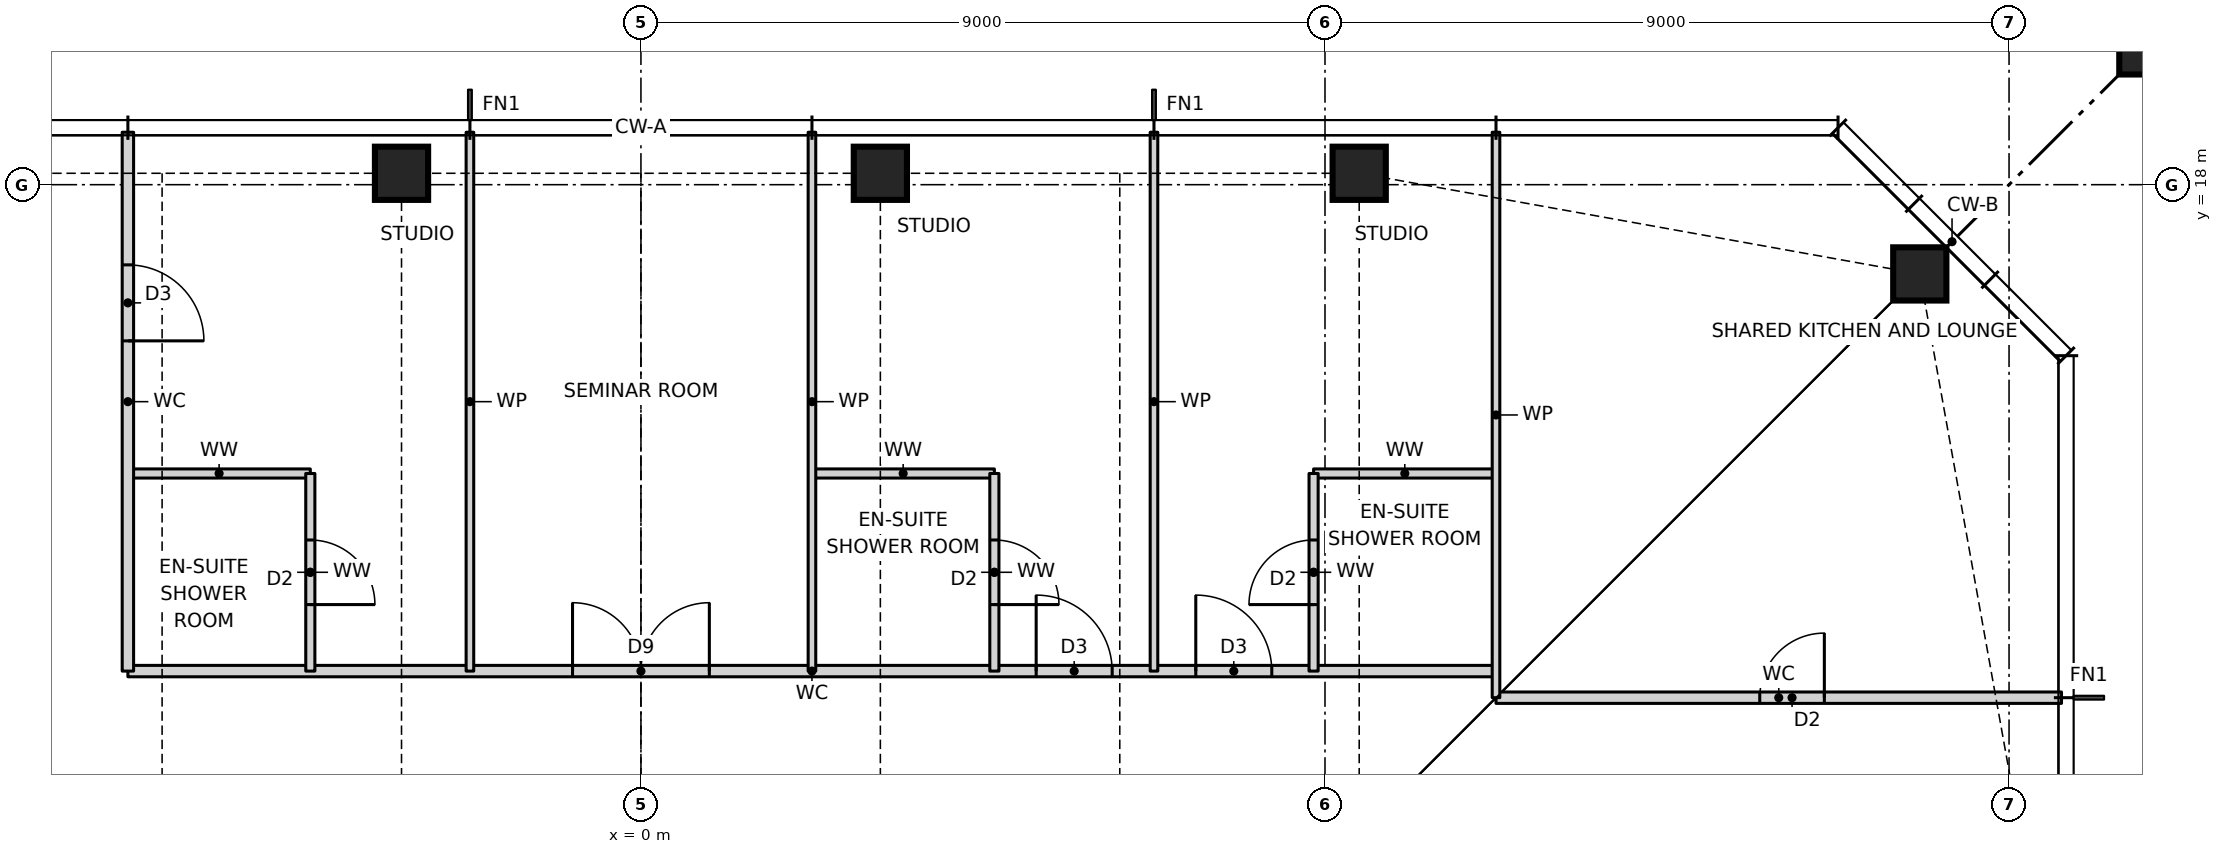
"""IFC4 building model, lengths in metres.
Left out: names, types, materials, properties, quantities, classifications, styles, units other than length and angle.
Written with IfcOpenShell. Run it as: python <this file> out.ifc"""

import sys

from ifc_helpers import new_model, si_unit, direction, frame, frame_2d, origin, origin_2d, place, context, subcontext, project, spatial, rectangle, hollow_rectangle, i_section, extrude, element, fill, save


model = new_model("IFC4")
c1 = context("Model", 3, precision=1e-05, world=origin(), true_north=direction((0.0, 1.0)))
c2 = subcontext(c1, "Body", "Model", "MODEL_VIEW")
j1 = project(units=[si_unit("LENGTHUNIT", "METRE"), si_unit("PLANEANGLEUNIT", "RADIAN")], contexts=[c1])
p1 = place(None, origin())
s1 = spatial("IfcSite", under=j1, at=p1, CompositionType="ELEMENT")
p2 = place(p1, origin())
s2 = spatial("IfcBuilding", under=s1, at=p2, CompositionType="ELEMENT")
p3 = place(p2, frame((0.0, 0.0, 156.5)))
s3 = spatial("IfcBuildingStorey", under=s2, at=p3, CompositionType="ELEMENT", Elevation=156.5)
for number, where, z_axis, x_axis in (
    (1, (16.826, 16.826, 0.0), (0.0, 0.0, 1.0), (1.0, 0.0, 0.0)),
    (2, (9.45, 18.15, 0.0), (0.0, 0.0, 1.0), (1.0, 0.0, 0.0)),
    (3, (3.15, 18.15, 0.0), (0.0, 0.0, 1.0), (1.0, 0.0, 0.0)),
    (4, (-3.15, 18.15, 0.0), (0.0, 0.0, 1.0), (1.0, 0.0, 0.0)),
):
    element("IfcColumn", number, at=place(p3, frame(where, z_axis=z_axis, x_axis=x_axis)), inside=s3, PredefinedType="COLUMN", context=c2, shape_type="SweptSolid", body=[
        extrude(hollow_rectangle(XDim=0.7, YDim=0.7, WallThickness=0.06, at=origin_2d()), origin(), (0.0, 0.0, 1.0), 3.5),
    ])
p4 = place(p3, frame((21.65, 21.65, 0.0), z_axis=(0.0, 0.0, 1.0), x_axis=(1.0, 0.0, 0.0)))
e5 = element("IfcColumn", 5, at=p4, inside=s3, PredefinedType="COLUMN", context=c2, shape_type="SweptSolid", body=[
    extrude(rectangle(XDim=4.4, YDim=4.4, at=origin_2d()), origin(), (0.0, 0.0, 1.0), 3.5),
    extrude(i_section(OverallWidth=0.478, OverallDepth=0.599, WebThickness=0.1, FlangeThickness=0.14, at=origin_2d()), origin(), (0.0, 0.0, 1.0), 3.5),
])
p5 = place(p3, frame((11.25, 11.25, 0.0), z_axis=(0.0, 0.0, 1.0), x_axis=(1.0, 0.0, 0.0)))
e6 = element("IfcWall", 6, at=p5, inside=s3, PredefinedType="PARTITIONING", context=c2, shape_type="SweptSolid", body=[
    extrude(rectangle(XDim=7.44, YDim=0.15, at=frame_2d((3.72, 0.0))), origin(), (0.0, 0.0, 1.0), 3.27),
])
p6 = place(p5, frame((3.47, 0.0, 0.0)))
e7 = element("IfcOpeningElement", 7, at=p6, cuts=e6, PredefinedType="OPENING", context=c2, shape_type="SweptSolid", body=[
    extrude(rectangle(XDim=0.85, YDim=2.1, at=frame_2d((0.425, 1.05))), frame((0.0, 0.085, 0.0), z_axis=(0.0, -1.0, 0.0), x_axis=(1.0, 0.0, 0.0)), (0.0, 0.0, 1.0), 0.17),
])
p7 = place(p3, frame((-6.75, 11.6, 0.0), z_axis=(0.0, 0.0, 1.0), x_axis=(1.0, 0.0, 0.0)))
e8 = element("IfcWall", 8, at=p7, inside=s3, PredefinedType="PARTITIONING", context=c2, shape_type="SweptSolid", body=[
    extrude(rectangle(XDim=18.0, YDim=0.15, at=frame_2d((9.0, 0.0))), origin(), (0.0, 0.0, 1.0), 3.27),
])
p8 = place(p7, frame((14.05, 0.0, 0.0)))
e9 = element("IfcOpeningElement", 9, at=p8, cuts=e8, PredefinedType="OPENING", context=c2, shape_type="SweptSolid", body=[
    extrude(rectangle(XDim=1.0, YDim=2.1, at=frame_2d((0.5, 1.05))), frame((0.0, 0.085, 0.0), z_axis=(0.0, -1.0, 0.0), x_axis=(1.0, 0.0, 0.0)), (0.0, 0.0, 1.0), 0.17),
])
p9 = place(p7, frame((11.95, 0.0, 0.0)))
e10 = element("IfcOpeningElement", 10, at=p9, cuts=e8, PredefinedType="OPENING", context=c2, shape_type="SweptSolid", body=[
    extrude(rectangle(XDim=1.0, YDim=2.1, at=frame_2d((0.5, 1.05))), frame((0.0, 0.085, 0.0), z_axis=(0.0, -1.0, 0.0), x_axis=(1.0, 0.0, 0.0)), (0.0, 0.0, 1.0), 0.17),
])
p10 = place(p7, frame((5.85, 0.0, 0.0)))
e11 = element("IfcOpeningElement", 11, at=p10, cuts=e8, PredefinedType="OPENING", context=c2, shape_type="SweptSolid", body=[
    extrude(rectangle(XDim=1.8, YDim=2.1, at=frame_2d((0.9, 1.05))), frame((0.0, 0.085, 0.0), z_axis=(0.0, -1.0, 0.0), x_axis=(1.0, 0.0, 0.0)), (0.0, 0.0, 1.0), 0.17),
])
for number, where, z_axis, x_axis in (
    (12, (-6.75, 14.2, 0.0), (0.0, 0.0, 1.0), (1.0, 0.0, 0.0)),
    (13, (2.25, 14.2, 0.0), (0.0, 0.0, 1.0), (1.0, 0.0, 0.0)),
    (14, (8.85, 14.2, 0.0), (0.0, 0.0, 1.0), (1.0, 0.0, 0.0)),
):
    element("IfcWall", number, at=place(p3, frame(where, z_axis=z_axis, x_axis=x_axis)), inside=s3, PredefinedType="PARTITIONING", context=c2, shape_type="SweptSolid", body=[
        extrude(rectangle(XDim=2.4, YDim=0.12, at=frame_2d((1.2, 0.0))), origin(), (0.0, 0.0, 1.0), 3.27),
    ])
p11 = place(p3, frame((11.25, 11.25, 0.0), z_axis=(0.0, 0.0, 1.0), x_axis=(0.0, 1.0, 0.0)))
e15 = element("IfcWall", 15, at=p11, inside=s3, PredefinedType="PARTITIONING", context=c2, shape_type="SweptSolid", body=[
    extrude(rectangle(XDim=7.44, YDim=0.1, at=frame_2d((3.72, 0.0))), origin(), (0.0, 0.0, 1.0), 3.27),
])
p12 = place(p3, frame((8.85, 11.6, 0.0), z_axis=(0.0, 0.0, 1.0), x_axis=(0.0, 1.0, 0.0)))
e16 = element("IfcWall", 16, at=p12, inside=s3, PredefinedType="PARTITIONING", context=c2, shape_type="SweptSolid", body=[
    extrude(rectangle(XDim=2.6, YDim=0.12, at=frame_2d((1.3, 0.0))), origin(), (0.0, 0.0, 1.0), 3.27),
])
p13 = place(p12, frame((0.875, 0.0, 0.0)))
e17 = element("IfcOpeningElement", 17, at=p13, cuts=e16, PredefinedType="OPENING", context=c2, shape_type="SweptSolid", body=[
    extrude(rectangle(XDim=0.85, YDim=2.1, at=frame_2d((0.425, 1.05))), frame((0.0, 0.07, 0.0), z_axis=(0.0, -1.0, 0.0), x_axis=(1.0, 0.0, 0.0)), (0.0, 0.0, 1.0), 0.14),
])
p14 = place(p3, frame((6.75, 11.6, 0.0), z_axis=(0.0, 0.0, 1.0), x_axis=(0.0, 1.0, 0.0)))
e18 = element("IfcWall", 18, at=p14, inside=s3, PredefinedType="PARTITIONING", context=c2, shape_type="SweptSolid", body=[
    extrude(rectangle(XDim=7.09, YDim=0.1, at=frame_2d((3.545, 0.0))), origin(), (0.0, 0.0, 1.0), 3.27),
])
p15 = place(p3, frame((4.65, 11.6, 0.0), z_axis=(0.0, 0.0, 1.0), x_axis=(0.0, 1.0, 0.0)))
e19 = element("IfcWall", 19, at=p15, inside=s3, PredefinedType="PARTITIONING", context=c2, shape_type="SweptSolid", body=[
    extrude(rectangle(XDim=2.6, YDim=0.12, at=frame_2d((1.3, 0.0))), origin(), (0.0, 0.0, 1.0), 3.27),
])
p16 = place(p15, frame((0.875, 0.0, 0.0)))
e20 = element("IfcOpeningElement", 20, at=p16, cuts=e19, PredefinedType="OPENING", context=c2, shape_type="SweptSolid", body=[
    extrude(rectangle(XDim=0.85, YDim=2.1, at=frame_2d((0.425, 1.05))), frame((0.0, 0.07, 0.0), z_axis=(0.0, -1.0, 0.0), x_axis=(1.0, 0.0, 0.0)), (0.0, 0.0, 1.0), 0.14),
])
for number, where, z_axis, x_axis in (
    (21, (2.25, 11.6, 0.0), (0.0, 0.0, 1.0), (0.0, 1.0, 0.0)),
    (22, (-2.25, 11.6, 0.0), (0.0, 0.0, 1.0), (0.0, 1.0, 0.0)),
):
    element("IfcWall", number, at=place(p3, frame(where, z_axis=z_axis, x_axis=x_axis)), inside=s3, PredefinedType="PARTITIONING", context=c2, shape_type="SweptSolid", body=[
        extrude(rectangle(XDim=7.09, YDim=0.1, at=frame_2d((3.545, 0.0))), origin(), (0.0, 0.0, 1.0), 3.27),
    ])
p17 = place(p3, frame((-4.35, 11.6, 0.0), z_axis=(0.0, 0.0, 1.0), x_axis=(0.0, 1.0, 0.0)))
e23 = element("IfcWall", 23, at=p17, inside=s3, PredefinedType="PARTITIONING", context=c2, shape_type="SweptSolid", body=[
    extrude(rectangle(XDim=2.6, YDim=0.12, at=frame_2d((1.3, 0.0))), origin(), (0.0, 0.0, 1.0), 3.27),
])
p18 = place(p17, frame((0.875, 0.0, 0.0)))
e24 = element("IfcOpeningElement", 24, at=p18, cuts=e23, PredefinedType="OPENING", context=c2, shape_type="SweptSolid", body=[
    extrude(rectangle(XDim=0.85, YDim=2.1, at=frame_2d((0.425, 1.05))), frame((0.0, 0.07, 0.0), z_axis=(0.0, -1.0, 0.0), x_axis=(1.0, 0.0, 0.0)), (0.0, 0.0, 1.0), 0.14),
])
p19 = place(p3, frame((-6.75, 11.6, 0.0), z_axis=(0.0, 0.0, 1.0), x_axis=(0.0, 1.0, 0.0)))
e25 = element("IfcWall", 25, at=p19, inside=s3, PredefinedType="PARTITIONING", context=c2, shape_type="SweptSolid", body=[
    extrude(rectangle(XDim=7.09, YDim=0.15, at=frame_2d((3.545, 0.0))), origin(), (0.0, 0.0, 1.0), 3.27),
])
p20 = place(p19, frame((4.345, 0.0, 0.0)))
e26 = element("IfcOpeningElement", 26, at=p20, cuts=e25, PredefinedType="OPENING", context=c2, shape_type="SweptSolid", body=[
    extrude(rectangle(XDim=1.0, YDim=2.1, at=frame_2d((0.5, 1.05))), frame((0.0, 0.085, 0.0), z_axis=(0.0, -1.0, 0.0), x_axis=(1.0, 0.0, 0.0)), (0.0, 0.0, 1.0), 0.17),
])
p21 = place(p8, origin())
e27 = element("IfcDoor", 27, at=p21, inside=s3, OperationType="SINGLE_SWING_LEFT", PredefinedType="DOOR", context=c2, shape_type="SweptSolid", body=[
    extrude(rectangle(XDim=1.0, YDim=2.1, at=frame_2d((0.5, 1.05))), frame((0.0, 0.025, 0.0), z_axis=(0.0, -1.0, 0.0), x_axis=(1.0, 0.0, 0.0)), (0.0, 0.0, 1.0), 0.05),
])
fill(e9, e27)
p22 = place(p13, origin())
e28 = element("IfcDoor", 28, at=p22, inside=s3, OperationType="SINGLE_SWING_LEFT", PredefinedType="DOOR", context=c2, shape_type="SweptSolid", body=[
    extrude(rectangle(XDim=0.85, YDim=2.1, at=frame_2d((0.425, 1.05))), frame((0.0, 0.025, 0.0), z_axis=(0.0, -1.0, 0.0), x_axis=(1.0, 0.0, 0.0)), (0.0, 0.0, 1.0), 0.05),
])
fill(e17, e28)
p23 = place(p9, origin())
e29 = element("IfcDoor", 29, at=p23, inside=s3, OperationType="SINGLE_SWING_LEFT", PredefinedType="DOOR", context=c2, shape_type="SweptSolid", body=[
    extrude(rectangle(XDim=1.0, YDim=2.1, at=frame_2d((0.5, 1.05))), frame((0.0, 0.025, 0.0), z_axis=(0.0, -1.0, 0.0), x_axis=(1.0, 0.0, 0.0)), (0.0, 0.0, 1.0), 0.05),
])
fill(e10, e29)
p24 = place(p16, frame((0.85, 0.0, 0.0), z_axis=(0.0, 0.0, 1.0), x_axis=(-1.0, 0.0, 0.0)))
e30 = element("IfcDoor", 30, at=p24, inside=s3, OperationType="SINGLE_SWING_RIGHT", PredefinedType="DOOR", context=c2, shape_type="SweptSolid", body=[
    extrude(rectangle(XDim=0.85, YDim=2.1, at=frame_2d((0.425, 1.05))), frame((0.0, 0.025, 0.0), z_axis=(0.0, -1.0, 0.0), x_axis=(1.0, 0.0, 0.0)), (0.0, 0.0, 1.0), 0.05),
])
fill(e20, e30)
p25 = place(p10, origin())
e31 = element("IfcDoor", 31, at=p25, inside=s3, OperationType="DOUBLE_DOOR_SINGLE_SWING", PredefinedType="DOOR", context=c2, shape_type="SweptSolid", body=[
    extrude(rectangle(XDim=1.8, YDim=2.1, at=frame_2d((0.9, 1.05))), frame((0.0, 0.025, 0.0), z_axis=(0.0, -1.0, 0.0), x_axis=(1.0, 0.0, 0.0)), (0.0, 0.0, 1.0), 0.05),
])
fill(e11, e31)
p26 = place(p20, frame((1.0, 0.0, 0.0), z_axis=(0.0, 0.0, 1.0), x_axis=(-1.0, 0.0, 0.0)))
e32 = element("IfcDoor", 32, at=p26, inside=s3, OperationType="SINGLE_SWING_RIGHT", PredefinedType="DOOR", context=c2, shape_type="SweptSolid", body=[
    extrude(rectangle(XDim=1.0, YDim=2.1, at=frame_2d((0.5, 1.05))), frame((0.0, 0.025, 0.0), z_axis=(0.0, -1.0, 0.0), x_axis=(1.0, 0.0, 0.0)), (0.0, 0.0, 1.0), 0.05),
])
fill(e26, e32)
p27 = place(p18, frame((0.85, 0.0, 0.0), z_axis=(0.0, 0.0, 1.0), x_axis=(-1.0, 0.0, 0.0)))
e33 = element("IfcDoor", 33, at=p27, inside=s3, OperationType="SINGLE_SWING_RIGHT", PredefinedType="DOOR", context=c2, shape_type="SweptSolid", body=[
    extrude(rectangle(XDim=0.85, YDim=2.1, at=frame_2d((0.425, 1.05))), frame((0.0, 0.025, 0.0), z_axis=(0.0, -1.0, 0.0), x_axis=(1.0, 0.0, 0.0)), (0.0, 0.0, 1.0), 0.05),
])
fill(e24, e33)
p28 = place(p6, origin())
e34 = element("IfcDoor", 34, at=p28, inside=s3, OperationType="SINGLE_SWING_RIGHT", PredefinedType="DOOR", context=c2, shape_type="SweptSolid", body=[
    extrude(rectangle(XDim=0.85, YDim=2.1, at=frame_2d((0.425, 1.05))), frame((0.0, 0.025, 0.0), z_axis=(0.0, -1.0, 0.0), x_axis=(1.0, 0.0, 0.0)), (0.0, 0.0, 1.0), 0.05),
])
fill(e7, e34)
save(model, sys.argv[1])
